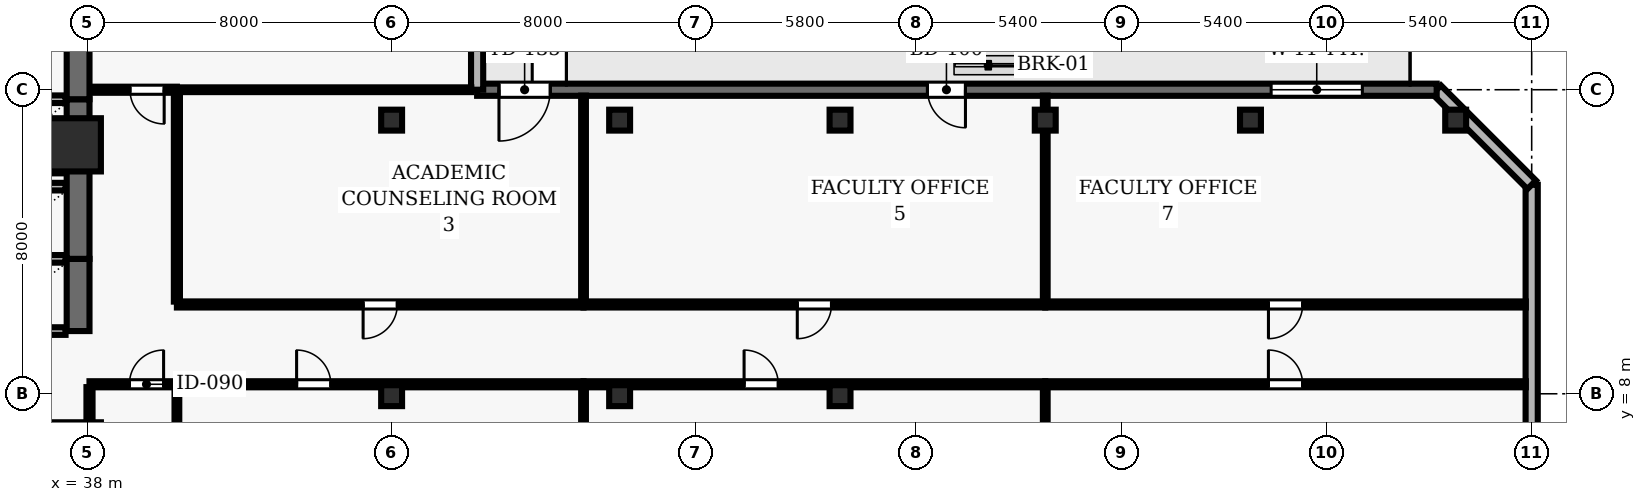
"""IFC4 building model, lengths in metres.
Left out: names, types, materials, properties, quantities, classifications, styles, units other than length and angle.
Written with IfcOpenShell. Run it as: python <this file> out.ifc"""

import sys

from ifc_helpers import new_model, si_unit, direction, frame, frame_2d, origin, origin_2d, place, context, subcontext, project, spatial, rectangle, hollow_rectangle, extrude, element, fill, save


model = new_model("IFC4")
c1 = context("Model", 3, precision=1e-05, world=origin(), true_north=direction((0.0, 1.0)))
c2 = subcontext(c1, "Body", "Model", "MODEL_VIEW")
j1 = project(units=[si_unit("LENGTHUNIT", "METRE"), si_unit("PLANEANGLEUNIT", "RADIAN")], contexts=[c1])
p1 = place(None, origin())
s1 = spatial("IfcSite", under=j1, at=p1, CompositionType="ELEMENT")
p2 = place(p1, origin())
s2 = spatial("IfcBuilding", under=s1, at=p2, CompositionType="ELEMENT")
p3 = place(p2, frame((0.0, 0.0, 77.8)))
s3 = spatial("IfcBuildingStorey", under=s2, at=p3, CompositionType="ELEMENT", Elevation=77.8)
p4 = place(p3, frame((37.65, 14.55, 0.0), z_axis=(0.0, 0.0, 1.0), x_axis=(1.0, 0.0, 0.0)))
e1 = element("IfcColumn", 1, at=p4, inside=s3, PredefinedType="COLUMN", context=c2, shape_type="SweptSolid", body=[
    extrude(rectangle(XDim=1.4, YDim=1.4, at=origin_2d()), origin(), (0.0, 0.0, 1.0), 3.9),
])
for number, where, z_axis, x_axis in (
    (2, (46.0, 7.95, 0.0), (0.0, 0.0, 1.0), (1.0, 0.0, 0.0)),
    (3, (46.0, 15.2, 0.0), (0.0, 0.0, 1.0), (1.0, 0.0, 0.0)),
    (4, (52.0, 7.95, 0.0), (0.0, 0.0, 1.0), (1.0, 0.0, 0.0)),
    (5, (52.0, 15.2, 0.0), (0.0, 0.0, 1.0), (1.0, 0.0, 0.0)),
    (6, (57.8, 7.95, 0.0), (0.0, 0.0, 1.0), (1.0, 0.0, 0.0)),
    (7, (57.8, 15.2, 0.0), (0.0, 0.0, 1.0), (1.0, 0.0, 0.0)),
    (8, (63.2, 15.2, 0.0), (0.0, 0.0, 1.0), (1.0, 0.0, 0.0)),
    (9, (68.6, 15.2, 0.0), (0.0, 0.0, 1.0), (1.0, 0.0, 0.0)),
    (10, (74.0, 15.2, 0.0), (0.0, 0.0, 1.0), (1.0, 0.0, 0.0)),
):
    element("IfcColumn", number, at=place(p3, frame(where, z_axis=z_axis, x_axis=x_axis)), inside=s3, PredefinedType="COLUMN", context=c2, shape_type="SweptSolid", body=[
        extrude(hollow_rectangle(XDim=0.55, YDim=0.55, WallThickness=0.025, at=origin_2d()), origin(), (0.0, 0.0, 1.0), 3.9),
    ])
p5 = place(p3, frame((76.0, 2.5, 0.0), z_axis=(0.0, 0.0, 1.0), x_axis=(0.0, 1.0, 0.0)))
e11 = element("IfcWall", 11, at=p5, inside=s3, PredefinedType="SOLIDWALL", context=c2, shape_type="SweptSolid", body=[
    extrude(rectangle(XDim=11.0, YDim=0.32, at=frame_2d((5.5, 0.0))), origin(), (0.0, 0.0, 1.0), 3.69),
])
p6 = place(p5, frame((1.35, 0.0, 0.9)))
e12 = element("IfcOpeningElement", 12, at=p6, cuts=e11, PredefinedType="OPENING", context=c2, shape_type="SweptSolid", body=[
    extrude(rectangle(XDim=2.8, YDim=1.8, at=frame_2d((1.4, 0.9))), frame((0.0, 0.17, 0.0), z_axis=(0.0, -1.0, 0.0), x_axis=(1.0, 0.0, 0.0)), (0.0, 0.0, 1.0), 0.34),
])
p7 = place(p3, frame((76.0, 13.5, 0.0), z_axis=(0.0, 0.0, 1.0), x_axis=(-0.707106781187, 0.707106781187, 0.0)))
e13 = element("IfcWall", 13, at=p7, inside=s3, PredefinedType="SOLIDWALL", context=c2, shape_type="SweptSolid", body=[
    extrude(rectangle(XDim=3.536, YDim=0.32, at=frame_2d((1.768, 0.0))), origin(), (0.0, 0.0, 1.0), 3.69),
])
p8 = place(p3, frame((73.5, 16.0, 0.0), z_axis=(0.0, 0.0, 1.0), x_axis=(-1.0, 0.0, 0.0)))
e14 = element("IfcWall", 14, at=p8, inside=s3, PredefinedType="SOLIDWALL", context=c2, shape_type="SweptSolid", body=[
    extrude(rectangle(XDim=25.25, YDim=0.32, at=frame_2d((12.625, 0.0))), origin(), (0.0, 0.0, 1.0), 3.69),
])
p9 = place(p8, frame((12.4, 0.0, 0.0)))
e15 = element("IfcOpeningElement", 15, at=p9, cuts=e14, PredefinedType="OPENING", context=c2, shape_type="SweptSolid", body=[
    extrude(rectangle(XDim=1.0, YDim=2.2, at=frame_2d((0.5, 1.1))), frame((0.0, 0.17, 0.0), z_axis=(0.0, -1.0, 0.0), x_axis=(1.0, 0.0, 0.0)), (0.0, 0.0, 1.0), 0.34),
])
p10 = place(p8, frame((23.325, 0.0, 0.0)))
e16 = element("IfcOpeningElement", 16, at=p10, cuts=e14, PredefinedType="OPENING", context=c2, shape_type="SweptSolid", body=[
    extrude(rectangle(XDim=1.35, YDim=2.2, at=frame_2d((0.675, 1.1))), frame((0.0, 0.17, 0.0), z_axis=(0.0, -1.0, 0.0), x_axis=(1.0, 0.0, 0.0)), (0.0, 0.0, 1.0), 0.34),
])
p11 = place(p8, frame((1.956, 0.0, 0.9)))
e17 = element("IfcOpeningElement", 17, at=p11, cuts=e14, PredefinedType="OPENING", context=c2, shape_type="SweptSolid", body=[
    extrude(rectangle(XDim=2.4, YDim=2.2, at=frame_2d((1.2, 1.1))), frame((0.0, 0.17, 0.0), z_axis=(0.0, -1.0, 0.0), x_axis=(1.0, 0.0, 0.0)), (0.0, 0.0, 1.0), 0.34),
])
p12 = place(p3, frame((48.25, 16.0, 0.0), z_axis=(0.0, 0.0, 1.0), x_axis=(0.0, 1.0, 0.0)))
e18 = element("IfcWall", 18, at=p12, inside=s3, PredefinedType="SOLIDWALL", context=c2, shape_type="SweptSolid", body=[
    extrude(rectangle(XDim=8.137, YDim=0.32, at=frame_2d((4.068, 0.0))), origin(), (0.0, 0.0, 1.0), 3.69),
])
p13 = place(p12, frame((2.569, 0.0, 0.9)))
e19 = element("IfcOpeningElement", 19, at=p13, cuts=e18, PredefinedType="OPENING", context=c2, shape_type="SweptSolid", body=[
    extrude(rectangle(XDim=3.0, YDim=2.2, at=frame_2d((1.5, 1.1))), frame((0.0, 0.17, 0.0), z_axis=(0.0, -1.0, 0.0), x_axis=(1.0, 0.0, 0.0)), (0.0, 0.0, 1.0), 0.34),
])
p14 = place(p3, frame((37.75, 9.65, 0.0), z_axis=(0.0, 0.0, 1.0), x_axis=(0.0, 1.0, 0.0)))
e20 = element("IfcWall", 20, at=p14, inside=s3, PredefinedType="SHEAR", context=c2, shape_type="SweptSolid", body=[
    extrude(rectangle(XDim=1.9, YDim=0.6, at=frame_2d((0.95, 0.0))), origin(), (0.0, 0.0, 1.0), 3.69),
])
for number, where, z_axis, x_axis in (
    (21, (35.28, 9.65, 0.0), (0.0, 0.0, 1.0), (1.0, 0.0, 0.0)),
    (22, (37.42, 11.55, 0.0), (0.0, 0.0, 1.0), (-1.0, 0.0, 0.0)),
):
    element("IfcWall", number, at=place(p3, frame(where, z_axis=z_axis, x_axis=x_axis)), inside=s3, PredefinedType="SOLIDWALL", context=c2, shape_type="SweptSolid", body=[
        extrude(rectangle(XDim=2.14, YDim=0.2, at=frame_2d((1.07, 0.0))), origin(), (0.0, 0.0, 1.0), 3.69),
    ])
p15 = place(p3, frame((37.75, 11.55, 0.0), z_axis=(0.0, 0.0, 1.0), x_axis=(0.0, 1.0, 0.0)))
e23 = element("IfcWall", 23, at=p15, inside=s3, PredefinedType="SHEAR", context=c2, shape_type="SweptSolid", body=[
    extrude(rectangle(XDim=2.35, YDim=0.6, at=frame_2d((1.175, 0.0))), origin(), (0.0, 0.0, 1.0), 3.69),
])
p16 = place(p3, frame((37.42, 13.45, 0.0), z_axis=(0.0, 0.0, 1.0), x_axis=(-1.0, 0.0, 0.0)))
e24 = element("IfcWall", 24, at=p16, inside=s3, PredefinedType="SOLIDWALL", context=c2, shape_type="SweptSolid", body=[
    extrude(rectangle(XDim=2.14, YDim=0.2, at=frame_2d((1.07, 0.0))), origin(), (0.0, 0.0, 1.0), 3.69),
])
p17 = place(p3, frame((37.75, 13.9, 0.0), z_axis=(0.0, 0.0, 1.0), x_axis=(0.0, 1.0, 0.0)))
e25 = element("IfcWall", 25, at=p17, inside=s3, PredefinedType="SHEAR", context=c2, shape_type="SweptSolid", body=[
    extrude(rectangle(XDim=1.85, YDim=0.6, at=frame_2d((0.925, 0.0))), origin(), (0.0, 0.0, 1.0), 3.69),
])
for number, where, z_axis, x_axis in (
    (26, (35.28, 13.9, 0.0), (0.0, 0.0, 1.0), (1.0, 0.0, 0.0)),
    (27, (37.42, 15.75, 0.0), (0.0, 0.0, 1.0), (-1.0, 0.0, 0.0)),
):
    element("IfcWall", number, at=place(p3, frame(where, z_axis=z_axis, x_axis=x_axis)), inside=s3, PredefinedType="SOLIDWALL", context=c2, shape_type="SweptSolid", body=[
        extrude(rectangle(XDim=2.14, YDim=0.2, at=frame_2d((1.07, 0.0))), origin(), (0.0, 0.0, 1.0), 3.69),
    ])
p18 = place(p3, frame((37.75, 15.75, 0.0), z_axis=(0.0, 0.0, 1.0), x_axis=(0.0, 1.0, 0.0)))
e28 = element("IfcWall", 28, at=p18, inside=s3, PredefinedType="SHEAR", context=c2, shape_type="SweptSolid", body=[
    extrude(rectangle(XDim=1.85, YDim=0.6, at=frame_2d((0.925, 0.0))), origin(), (0.0, 0.0, 1.0), 3.69),
])
p19 = place(p3, frame((38.05, 8.25, 0.0), z_axis=(0.0, 0.0, 1.0), x_axis=(1.0, 0.0, 0.0)))
e29 = element("IfcWall", 29, at=p19, inside=s3, PredefinedType="PARTITIONING", context=c2, shape_type="SweptSolid", body=[
    extrude(rectangle(XDim=2.3, YDim=0.16, at=frame_2d((1.15, 0.0))), origin(), (0.0, 0.0, 1.0), 2.995),
])
p20 = place(p19, frame((1.05, 0.0, 0.0)))
e30 = element("IfcOpeningElement", 30, at=p20, cuts=e29, PredefinedType="OPENING", context=c2, shape_type="SweptSolid", body=[
    extrude(rectangle(XDim=0.9, YDim=2.1, at=frame_2d((0.45, 1.05))), frame((0.0, 0.09, 0.0), z_axis=(0.0, -1.0, 0.0), x_axis=(1.0, 0.0, 0.0)), (0.0, 0.0, 1.0), 0.18),
])
p21 = place(p3, frame((40.35, 8.25, 0.0), z_axis=(0.0, 0.0, 1.0), x_axis=(1.0, 0.0, 0.0)))
e31 = element("IfcWall", 31, at=p21, inside=s3, PredefinedType="PARTITIONING", context=c2, shape_type="SweptSolid", body=[
    extrude(rectangle(XDim=10.7, YDim=0.16, at=frame_2d((5.35, 0.0))), origin(), (0.0, 0.0, 1.0), 2.995),
])
p22 = place(p21, frame((3.15, 0.0, 0.0)))
e32 = element("IfcOpeningElement", 32, at=p22, cuts=e31, PredefinedType="OPENING", context=c2, shape_type="SweptSolid", body=[
    extrude(rectangle(XDim=0.9, YDim=2.1, at=frame_2d((0.45, 1.05))), frame((0.0, 0.09, 0.0), z_axis=(0.0, -1.0, 0.0), x_axis=(1.0, 0.0, 0.0)), (0.0, 0.0, 1.0), 0.18),
])
p23 = place(p3, frame((40.35, 16.0, 0.0), z_axis=(0.0, 0.0, 1.0), x_axis=(1.0, 0.0, 0.0)))
e33 = element("IfcWall", 33, at=p23, inside=s3, PredefinedType="PARTITIONING", context=c2, shape_type="SweptSolid", body=[
    extrude(rectangle(XDim=7.745, YDim=0.125, at=frame_2d((3.873, 0.0))), origin(), (0.0, 0.0, 1.0), 3.39),
])
p24 = place(p3, frame((40.35, 16.0, 0.0), z_axis=(0.0, 0.0, 1.0), x_axis=(-1.0, 0.0, 0.0)))
e34 = element("IfcWall", 34, at=p24, inside=s3, PredefinedType="PARTITIONING", context=c2, shape_type="SweptSolid", body=[
    extrude(rectangle(XDim=2.27, YDim=0.16, at=frame_2d((1.135, 0.0))), origin(), (0.0, 0.0, 1.0), 3.69),
])
p25 = place(p24, frame((0.335, 0.0, 0.0)))
e35 = element("IfcOpeningElement", 35, at=p25, cuts=e34, PredefinedType="OPENING", context=c2, shape_type="SweptSolid", body=[
    extrude(rectangle(XDim=0.9, YDim=2.1, at=frame_2d((0.45, 1.05))), frame((0.0, 0.09, 0.0), z_axis=(0.0, -1.0, 0.0), x_axis=(1.0, 0.0, 0.0)), (0.0, 0.0, 1.0), 0.18),
])
p26 = place(p3, frame((51.05, 8.25, 0.0), z_axis=(0.0, 0.0, 1.0), x_axis=(1.0, 0.0, 0.0)))
e36 = element("IfcWall", 36, at=p26, inside=s3, PredefinedType="PARTITIONING", context=c2, shape_type="SweptSolid", body=[
    extrude(rectangle(XDim=12.15, YDim=0.16, at=frame_2d((6.075, 0.0))), origin(), (0.0, 0.0, 1.0), 2.995),
])
p27 = place(p26, frame((4.225, 0.0, 0.0)))
e37 = element("IfcOpeningElement", 37, at=p27, cuts=e36, PredefinedType="OPENING", context=c2, shape_type="SweptSolid", body=[
    extrude(rectangle(XDim=0.9, YDim=2.1, at=frame_2d((0.45, 1.05))), frame((0.0, 0.09, 0.0), z_axis=(0.0, -1.0, 0.0), x_axis=(1.0, 0.0, 0.0)), (0.0, 0.0, 1.0), 0.18),
])
p28 = place(p3, frame((51.05, 10.35, 0.0), z_axis=(0.0, 0.0, 1.0), x_axis=(-1.0, 0.0, 0.0)))
e38 = element("IfcWall", 38, at=p28, inside=s3, PredefinedType="PARTITIONING", context=c2, shape_type="SweptSolid", body=[
    extrude(rectangle(XDim=10.7, YDim=0.16, at=frame_2d((5.35, 0.0))), origin(), (0.0, 0.0, 1.0), 3.227),
])
p29 = place(p28, frame((4.9, 0.0, 0.0)))
e39 = element("IfcOpeningElement", 39, at=p29, cuts=e38, PredefinedType="OPENING", context=c2, shape_type="SweptSolid", body=[
    extrude(rectangle(XDim=0.9, YDim=2.1, at=frame_2d((0.45, 1.05))), frame((0.0, 0.09, 0.0), z_axis=(0.0, -1.0, 0.0), x_axis=(1.0, 0.0, 0.0)), (0.0, 0.0, 1.0), 0.18),
])
p30 = place(p3, frame((63.2, 8.25, 0.0), z_axis=(0.0, 0.0, 1.0), x_axis=(1.0, 0.0, 0.0)))
e40 = element("IfcWall", 40, at=p30, inside=s3, PredefinedType="PARTITIONING", context=c2, shape_type="SweptSolid", body=[
    extrude(rectangle(XDim=12.645, YDim=0.16, at=frame_2d((6.323, 0.0))), origin(), (0.0, 0.0, 1.0), 3.69),
])
p31 = place(p30, frame((5.872, 0.0, 0.0)))
e41 = element("IfcOpeningElement", 41, at=p31, cuts=e40, PredefinedType="OPENING", context=c2, shape_type="SweptSolid", body=[
    extrude(rectangle(XDim=0.9, YDim=2.1, at=frame_2d((0.45, 1.05))), frame((0.0, 0.09, 0.0), z_axis=(0.0, -1.0, 0.0), x_axis=(1.0, 0.0, 0.0)), (0.0, 0.0, 1.0), 0.18),
])
p32 = place(p3, frame((63.2, 10.35, 0.0), z_axis=(0.0, 0.0, 1.0), x_axis=(-1.0, 0.0, 0.0)))
e42 = element("IfcWall", 42, at=p32, inside=s3, PredefinedType="PARTITIONING", context=c2, shape_type="SweptSolid", body=[
    extrude(rectangle(XDim=12.15, YDim=0.16, at=frame_2d((6.075, 0.0))), origin(), (0.0, 0.0, 1.0), 3.227),
])
p33 = place(p32, frame((5.625, 0.0, 0.0)))
e43 = element("IfcOpeningElement", 43, at=p33, cuts=e42, PredefinedType="OPENING", context=c2, shape_type="SweptSolid", body=[
    extrude(rectangle(XDim=0.9, YDim=2.1, at=frame_2d((0.45, 1.05))), frame((0.0, 0.09, 0.0), z_axis=(0.0, -1.0, 0.0), x_axis=(1.0, 0.0, 0.0)), (0.0, 0.0, 1.0), 0.18),
])
p34 = place(p3, frame((75.845, 10.35, 0.0), z_axis=(0.0, 0.0, 1.0), x_axis=(-1.0, 0.0, 0.0)))
e44 = element("IfcWall", 44, at=p34, inside=s3, PredefinedType="PARTITIONING", context=c2, shape_type="SweptSolid", body=[
    extrude(rectangle(XDim=12.645, YDim=0.16, at=frame_2d((6.323, 0.0))), origin(), (0.0, 0.0, 1.0), 3.227),
])
p35 = place(p34, frame((5.872, 0.0, 0.0)))
e45 = element("IfcOpeningElement", 45, at=p35, cuts=e44, PredefinedType="OPENING", context=c2, shape_type="SweptSolid", body=[
    extrude(rectangle(XDim=0.9, YDim=2.1, at=frame_2d((0.45, 1.05))), frame((0.0, 0.09, 0.0), z_axis=(0.0, -1.0, 0.0), x_axis=(1.0, 0.0, 0.0)), (0.0, 0.0, 1.0), 0.18),
])
p36 = place(p3, frame((38.05, 7.05, 0.0), z_axis=(0.0, 0.0, 1.0), x_axis=(0.0, 1.0, 0.0)))
e46 = element("IfcWall", 46, at=p36, inside=s3, PredefinedType="PARTITIONING", context=c2, shape_type="SweptSolid", body=[
    extrude(rectangle(XDim=1.125, YDim=0.16, at=frame_2d((0.562, 0.0))), origin(), (0.0, 0.0, 1.0), 2.995),
])
p37 = place(p3, frame((40.35, 0.155, 0.0), z_axis=(0.0, 0.0, 1.0), x_axis=(0.0, 1.0, 0.0)))
e47 = element("IfcWall", 47, at=p37, inside=s3, PredefinedType="PARTITIONING", context=c2, shape_type="SweptSolid", body=[
    extrude(rectangle(XDim=8.02, YDim=0.125, at=frame_2d((4.01, 0.0))), origin(), (0.0, 0.0, 1.0), 3.69),
])
p38 = place(p3, frame((40.35, 10.425, 0.0), z_axis=(0.0, 0.0, 1.0), x_axis=(0.0, 1.0, 0.0)))
e48 = element("IfcWall", 48, at=p38, inside=s3, PredefinedType="PARTITIONING", context=c2, shape_type="SweptSolid", body=[
    extrude(rectangle(XDim=5.5, YDim=0.16, at=frame_2d((2.75, 0.0))), origin(), (0.0, 0.0, 1.0), 3.227),
])
p39 = place(p3, frame((51.05, 0.155, 0.0), z_axis=(0.0, 0.0, 1.0), x_axis=(0.0, 1.0, 0.0)))
e49 = element("IfcWall", 49, at=p39, inside=s3, PredefinedType="PARTITIONING", context=c2, shape_type="SweptSolid", body=[
    extrude(rectangle(XDim=8.02, YDim=0.125, at=frame_2d((4.01, 0.0))), origin(), (0.0, 0.0, 1.0), 3.69),
])
p40 = place(p3, frame((51.05, 10.425, 0.0), z_axis=(0.0, 0.0, 1.0), x_axis=(0.0, 1.0, 0.0)))
e50 = element("IfcWall", 50, at=p40, inside=s3, PredefinedType="PARTITIONING", context=c2, shape_type="SweptSolid", body=[
    extrude(rectangle(XDim=5.42, YDim=0.125, at=frame_2d((2.71, 0.0))), origin(), (0.0, 0.0, 1.0), 3.69),
])
p41 = place(p3, frame((63.2, 0.155, 0.0), z_axis=(0.0, 0.0, 1.0), x_axis=(0.0, 1.0, 0.0)))
e51 = element("IfcWall", 51, at=p41, inside=s3, PredefinedType="PARTITIONING", context=c2, shape_type="SweptSolid", body=[
    extrude(rectangle(XDim=8.02, YDim=0.125, at=frame_2d((4.01, 0.0))), origin(), (0.0, 0.0, 1.0), 2.995),
])
p42 = place(p3, frame((63.2, 10.425, 0.0), z_axis=(0.0, 0.0, 1.0), x_axis=(0.0, 1.0, 0.0)))
e52 = element("IfcWall", 52, at=p42, inside=s3, PredefinedType="PARTITIONING", context=c2, shape_type="SweptSolid", body=[
    extrude(rectangle(XDim=5.42, YDim=0.125, at=frame_2d((2.71, 0.0))), origin(), (0.0, 0.0, 1.0), 2.995),
])
p43 = place(p9, origin())
e53 = element("IfcDoor", 53, at=p43, inside=s3, OperationType="SINGLE_SWING_LEFT", PredefinedType="DOOR", context=c2, shape_type="SweptSolid", body=[
    extrude(rectangle(XDim=1.0, YDim=2.2, at=frame_2d((0.5, 1.1))), frame((0.0, 0.025, 0.0), z_axis=(0.0, -1.0, 0.0), x_axis=(1.0, 0.0, 0.0)), (0.0, 0.0, 1.0), 0.05),
])
fill(e15, e53)
p44 = place(p10, origin())
e54 = element("IfcDoor", 54, at=p44, inside=s3, OperationType="SINGLE_SWING_RIGHT", PredefinedType="DOOR", context=c2, shape_type="SweptSolid", body=[
    extrude(rectangle(XDim=1.35, YDim=2.2, at=frame_2d((0.675, 1.1))), frame((0.0, 0.025, 0.0), z_axis=(0.0, -1.0, 0.0), x_axis=(1.0, 0.0, 0.0)), (0.0, 0.0, 1.0), 0.05),
])
fill(e16, e54)
p45 = place(p11, origin())
e55 = element("IfcWindow", 55, at=p45, inside=s3, PartitioningType="SINGLE_PANEL", PredefinedType="WINDOW", context=c2, shape_type="SweptSolid", body=[
    extrude(rectangle(XDim=2.4, YDim=2.2, at=frame_2d((1.2, 1.1))), frame((0.0, 0.03, 0.0), z_axis=(0.0, -1.0, 0.0), x_axis=(1.0, 0.0, 0.0)), (0.0, 0.0, 1.0), 0.06),
])
fill(e17, e55)
p46 = place(p20, origin())
e56 = element("IfcDoor", 56, at=p46, inside=s3, OperationType="SINGLE_SWING_RIGHT", PredefinedType="DOOR", context=c2, shape_type="SweptSolid", body=[
    extrude(rectangle(XDim=0.9, YDim=2.1, at=frame_2d((0.45, 1.05))), frame((0.0, 0.025, 0.0), z_axis=(0.0, -1.0, 0.0), x_axis=(1.0, 0.0, 0.0)), (0.0, 0.0, 1.0), 0.05),
])
fill(e30, e56)
p47 = place(p22, origin())
e57 = element("IfcDoor", 57, at=p47, inside=s3, OperationType="SINGLE_SWING_LEFT", PredefinedType="DOOR", context=c2, shape_type="SweptSolid", body=[
    extrude(rectangle(XDim=0.9, YDim=2.1, at=frame_2d((0.45, 1.05))), frame((0.0, 0.025, 0.0), z_axis=(0.0, -1.0, 0.0), x_axis=(1.0, 0.0, 0.0)), (0.0, 0.0, 1.0), 0.05),
])
fill(e32, e57)
p48 = place(p29, origin())
e58 = element("IfcDoor", 58, at=p48, inside=s3, OperationType="SINGLE_SWING_RIGHT", PredefinedType="DOOR", context=c2, shape_type="SweptSolid", body=[
    extrude(rectangle(XDim=0.9, YDim=2.1, at=frame_2d((0.45, 1.05))), frame((0.0, 0.025, 0.0), z_axis=(0.0, -1.0, 0.0), x_axis=(1.0, 0.0, 0.0)), (0.0, 0.0, 1.0), 0.05),
])
fill(e39, e58)
p49 = place(p27, origin())
e59 = element("IfcDoor", 59, at=p49, inside=s3, OperationType="SINGLE_SWING_LEFT", PredefinedType="DOOR", context=c2, shape_type="SweptSolid", body=[
    extrude(rectangle(XDim=0.9, YDim=2.1, at=frame_2d((0.45, 1.05))), frame((0.0, 0.025, 0.0), z_axis=(0.0, -1.0, 0.0), x_axis=(1.0, 0.0, 0.0)), (0.0, 0.0, 1.0), 0.05),
])
fill(e37, e59)
p50 = place(p33, origin())
e60 = element("IfcDoor", 60, at=p50, inside=s3, OperationType="SINGLE_SWING_RIGHT", PredefinedType="DOOR", context=c2, shape_type="SweptSolid", body=[
    extrude(rectangle(XDim=0.9, YDim=2.1, at=frame_2d((0.45, 1.05))), frame((0.0, 0.025, 0.0), z_axis=(0.0, -1.0, 0.0), x_axis=(1.0, 0.0, 0.0)), (0.0, 0.0, 1.0), 0.05),
])
fill(e43, e60)
p51 = place(p31, origin())
e61 = element("IfcDoor", 61, at=p51, inside=s3, OperationType="SINGLE_SWING_LEFT", PredefinedType="DOOR", context=c2, shape_type="SweptSolid", body=[
    extrude(rectangle(XDim=0.9, YDim=2.1, at=frame_2d((0.45, 1.05))), frame((0.0, 0.025, 0.0), z_axis=(0.0, -1.0, 0.0), x_axis=(1.0, 0.0, 0.0)), (0.0, 0.0, 1.0), 0.05),
])
fill(e41, e61)
p52 = place(p35, origin())
e62 = element("IfcDoor", 62, at=p52, inside=s3, OperationType="SINGLE_SWING_RIGHT", PredefinedType="DOOR", context=c2, shape_type="SweptSolid", body=[
    extrude(rectangle(XDim=0.9, YDim=2.1, at=frame_2d((0.45, 1.05))), frame((0.0, 0.025, 0.0), z_axis=(0.0, -1.0, 0.0), x_axis=(1.0, 0.0, 0.0)), (0.0, 0.0, 1.0), 0.05),
])
fill(e45, e62)
p53 = place(p25, origin())
e63 = element("IfcDoor", 63, at=p53, inside=s3, OperationType="SINGLE_SWING_LEFT", PredefinedType="DOOR", context=c2, shape_type="SweptSolid", body=[
    extrude(rectangle(XDim=0.9, YDim=2.1, at=frame_2d((0.45, 1.05))), frame((0.0, 0.025, 0.0), z_axis=(0.0, -1.0, 0.0), x_axis=(1.0, 0.0, 0.0)), (0.0, 0.0, 1.0), 0.05),
])
fill(e35, e63)
save(model, sys.argv[1])
